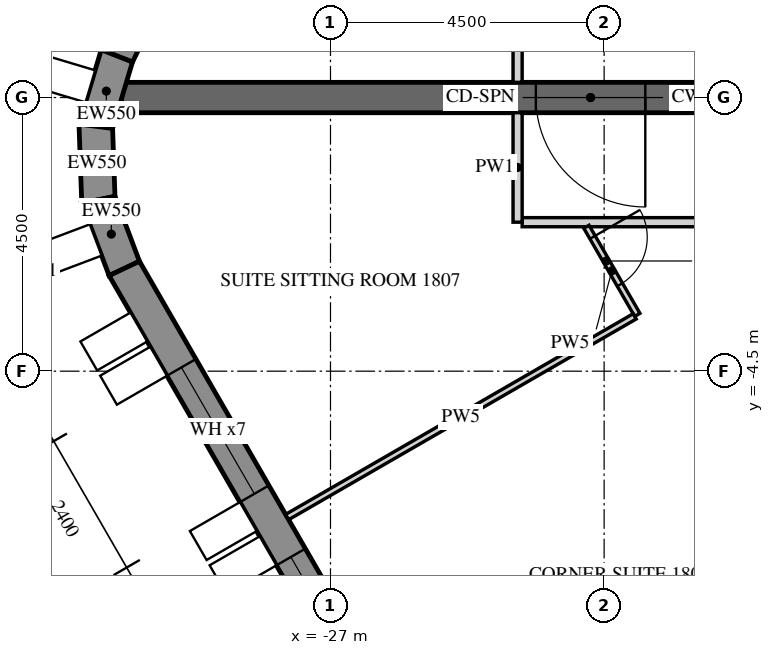
"""IFC4 building model, lengths in metres.
Left out: names, types, materials, properties, quantities, classifications, styles, units other than length and angle.
Written with IfcOpenShell. Run it as: python <this file> out.ifc"""

import sys

from ifc_helpers import new_model, si_unit, direction, frame, frame_2d, origin, place, context, subcontext, project, spatial, polyline, rectangle, outline, extrude, element, fill, save


model = new_model("IFC4")
c1 = context("Model", 3, precision=1e-05, world=origin(), true_north=direction((0.0, 1.0)))
c2 = subcontext(c1, "Body", "Model", "MODEL_VIEW")
j1 = project(units=[si_unit("LENGTHUNIT", "METRE"), si_unit("PLANEANGLEUNIT", "RADIAN")], contexts=[c1])
p1 = place(None, origin())
s1 = spatial("IfcSite", under=j1, at=p1, CompositionType="ELEMENT")
p2 = place(p1, origin())
s2 = spatial("IfcBuilding", under=s1, at=p2, CompositionType="ELEMENT")
p3 = place(p2, frame((0.0, 0.0, 226.8)))
s3 = spatial("IfcBuildingStorey", under=s2, at=p3, CompositionType="ELEMENT", Elevation=226.8)
p4 = place(p3, frame((-18.345, 25.633, -0.15), z_axis=(0.0, 0.0, 1.0), x_axis=(-0.43837181828, -0.898793718791, 0.0)))
e1 = element("IfcWall", 1, at=p4, inside=s3, PredefinedType="SOLIDWALL", context=c2, shape_type="SweptSolid", body=[
    extrude(outline(polyline([(-0.026, -0.275), (27.78, -0.275), (27.735, 0.275), (0.026, 0.275), (-0.026, -0.275)])), origin(), (0.0, 0.0, 1.0), 3.9),
])
p5 = place(p4, frame((1.879, 0.0, 1.05)))
e2 = element("IfcOpeningElement", 2, at=p5, cuts=e1, PredefinedType="OPENING", context=c2, shape_type="SweptSolid", body=[
    extrude(rectangle(XDim=2.4, YDim=2.4, at=frame_2d((1.2, 1.2))), frame((0.0, 0.285, 0.0), z_axis=(0.0, -1.0, 0.0), x_axis=(1.0, 0.0, 0.0)), (0.0, 0.0, 1.0), 0.57),
])
p6 = place(p4, frame((5.479, 0.0, 1.05)))
e3 = element("IfcOpeningElement", 3, at=p6, cuts=e1, PredefinedType="OPENING", context=c2, shape_type="SweptSolid", body=[
    extrude(rectangle(XDim=2.4, YDim=2.4, at=frame_2d((1.2, 1.2))), frame((0.0, 0.285, 0.0), z_axis=(0.0, -1.0, 0.0), x_axis=(1.0, 0.0, 0.0)), (0.0, 0.0, 1.0), 0.57),
])
p7 = place(p4, frame((9.079, 0.0, 1.05)))
e4 = element("IfcOpeningElement", 4, at=p7, cuts=e1, PredefinedType="OPENING", context=c2, shape_type="SweptSolid", body=[
    extrude(rectangle(XDim=2.4, YDim=2.4, at=frame_2d((1.2, 1.2))), frame((0.0, 0.285, 0.0), z_axis=(0.0, -1.0, 0.0), x_axis=(1.0, 0.0, 0.0)), (0.0, 0.0, 1.0), 0.57),
])
p8 = place(p4, frame((12.679, 0.0, 1.05)))
e5 = element("IfcOpeningElement", 5, at=p8, cuts=e1, PredefinedType="OPENING", context=c2, shape_type="SweptSolid", body=[
    extrude(rectangle(XDim=2.4, YDim=2.4, at=frame_2d((1.2, 1.2))), frame((0.0, 0.285, 0.0), z_axis=(0.0, -1.0, 0.0), x_axis=(1.0, 0.0, 0.0)), (0.0, 0.0, 1.0), 0.57),
])
p9 = place(p4, frame((16.279, 0.0, 1.05)))
e6 = element("IfcOpeningElement", 6, at=p9, cuts=e1, PredefinedType="OPENING", context=c2, shape_type="SweptSolid", body=[
    extrude(rectangle(XDim=2.4, YDim=2.4, at=frame_2d((1.2, 1.2))), frame((0.0, 0.285, 0.0), z_axis=(0.0, -1.0, 0.0), x_axis=(1.0, 0.0, 0.0)), (0.0, 0.0, 1.0), 0.57),
])
p10 = place(p4, frame((19.879, 0.0, 1.05)))
e7 = element("IfcOpeningElement", 7, at=p10, cuts=e1, PredefinedType="OPENING", context=c2, shape_type="SweptSolid", body=[
    extrude(rectangle(XDim=2.4, YDim=2.4, at=frame_2d((1.2, 1.2))), frame((0.0, 0.285, 0.0), z_axis=(0.0, -1.0, 0.0), x_axis=(1.0, 0.0, 0.0)), (0.0, 0.0, 1.0), 0.57),
])
p11 = place(p4, frame((23.479, 0.0, 1.05)))
e8 = element("IfcOpeningElement", 8, at=p11, cuts=e1, PredefinedType="OPENING", context=c2, shape_type="SweptSolid", body=[
    extrude(rectangle(XDim=2.4, YDim=2.4, at=frame_2d((1.2, 1.2))), frame((0.0, 0.285, 0.0), z_axis=(0.0, -1.0, 0.0), x_axis=(1.0, 0.0, 0.0)), (0.0, 0.0, 1.0), 0.57),
])
p12 = place(p3, frame((-30.513, 0.684, -0.15), z_axis=(0.0, 0.0, 1.0), x_axis=(-0.286736058109, -0.958009620505, 0.0)))
e9 = element("IfcWall", 9, at=p12, inside=s3, PredefinedType="SOLIDWALL", context=c2, shape_type="SweptSolid", body=[
    extrude(outline(polyline([(-0.022, -0.275), (1.253, -0.275), (1.163, 0.275), (0.022, 0.275), (-0.022, -0.275)])), origin(), (0.0, 0.0, 1.0), 3.9),
])
p13 = place(p3, frame((-30.86, -0.473, -0.15), z_axis=(0.0, 0.0, 1.0), x_axis=(0.03495638276, -0.999388838893, 0.0)))
e10 = element("IfcWall", 10, at=p13, inside=s3, PredefinedType="SOLIDWALL", context=c2, shape_type="SweptSolid", body=[
    extrude(outline(polyline([(-0.045, -0.275), (1.253, -0.275), (1.163, 0.275), (0.045, 0.275), (-0.045, -0.275)])), origin(), (0.0, 0.0, 1.0), 3.9),
])
p14 = place(p3, frame((-30.817, -1.681, -0.15), z_axis=(0.0, 0.0, 1.0), x_axis=(0.352850303963, -0.935679786569, 0.0)))
e11 = element("IfcWall", 11, at=p14, inside=s3, PredefinedType="SOLIDWALL", context=c2, shape_type="SweptSolid", body=[
    extrude(outline(polyline([(-0.045, -0.275), (1.23, -0.275), (1.186, 0.275), (0.045, 0.275), (-0.045, -0.275)])), origin(), (0.0, 0.0, 1.0), 3.9),
])
p15 = place(p3, frame((-30.391, -2.811, -0.15), z_axis=(0.0, 0.0, 1.0), x_axis=(0.499998569178, -0.866026229868, 0.0)))
e12 = element("IfcWall", 12, at=p15, inside=s3, PredefinedType="SOLIDWALL", context=c2, shape_type="SweptSolid", body=[
    extrude(outline(polyline([(-0.022, -0.275), (27.783, -0.275), (27.732, 0.275), (0.022, 0.275), (-0.022, -0.275)])), origin(), (0.0, 0.0, 1.0), 3.9),
])
p16 = place(p15, frame((1.879, 0.0, 1.05)))
e13 = element("IfcOpeningElement", 13, at=p16, cuts=e12, PredefinedType="OPENING", context=c2, shape_type="SweptSolid", body=[
    extrude(rectangle(XDim=2.4, YDim=2.4, at=frame_2d((1.2, 1.2))), frame((0.0, 0.285, 0.0), z_axis=(0.0, -1.0, 0.0), x_axis=(1.0, 0.0, 0.0)), (0.0, 0.0, 1.0), 0.57),
])
p17 = place(p15, frame((5.479, 0.0, 1.05)))
e14 = element("IfcOpeningElement", 14, at=p17, cuts=e12, PredefinedType="OPENING", context=c2, shape_type="SweptSolid", body=[
    extrude(rectangle(XDim=2.4, YDim=2.4, at=frame_2d((1.2, 1.2))), frame((0.0, 0.285, 0.0), z_axis=(0.0, -1.0, 0.0), x_axis=(1.0, 0.0, 0.0)), (0.0, 0.0, 1.0), 0.57),
])
p18 = place(p15, frame((9.079, 0.0, 1.05)))
e15 = element("IfcOpeningElement", 15, at=p18, cuts=e12, PredefinedType="OPENING", context=c2, shape_type="SweptSolid", body=[
    extrude(rectangle(XDim=2.4, YDim=2.4, at=frame_2d((1.2, 1.2))), frame((0.0, 0.285, 0.0), z_axis=(0.0, -1.0, 0.0), x_axis=(1.0, 0.0, 0.0)), (0.0, 0.0, 1.0), 0.57),
])
p19 = place(p15, frame((12.679, 0.0, 1.05)))
e16 = element("IfcOpeningElement", 16, at=p19, cuts=e12, PredefinedType="OPENING", context=c2, shape_type="SweptSolid", body=[
    extrude(rectangle(XDim=2.4, YDim=2.4, at=frame_2d((1.2, 1.2))), frame((0.0, 0.285, 0.0), z_axis=(0.0, -1.0, 0.0), x_axis=(1.0, 0.0, 0.0)), (0.0, 0.0, 1.0), 0.57),
])
p20 = place(p15, frame((16.279, 0.0, 1.05)))
e17 = element("IfcOpeningElement", 17, at=p20, cuts=e12, PredefinedType="OPENING", context=c2, shape_type="SweptSolid", body=[
    extrude(rectangle(XDim=2.4, YDim=2.4, at=frame_2d((1.2, 1.2))), frame((0.0, 0.285, 0.0), z_axis=(0.0, -1.0, 0.0), x_axis=(1.0, 0.0, 0.0)), (0.0, 0.0, 1.0), 0.57),
])
p21 = place(p15, frame((19.879, 0.0, 1.05)))
e18 = element("IfcOpeningElement", 18, at=p21, cuts=e12, PredefinedType="OPENING", context=c2, shape_type="SweptSolid", body=[
    extrude(rectangle(XDim=2.4, YDim=2.4, at=frame_2d((1.2, 1.2))), frame((0.0, 0.285, 0.0), z_axis=(0.0, -1.0, 0.0), x_axis=(1.0, 0.0, 0.0)), (0.0, 0.0, 1.0), 0.57),
])
p22 = place(p15, frame((23.479, 0.0, 1.05)))
e19 = element("IfcOpeningElement", 19, at=p22, cuts=e12, PredefinedType="OPENING", context=c2, shape_type="SweptSolid", body=[
    extrude(rectangle(XDim=2.4, YDim=2.4, at=frame_2d((1.2, 1.2))), frame((0.0, 0.285, 0.0), z_axis=(0.0, -1.0, 0.0), x_axis=(1.0, 0.0, 0.0)), (0.0, 0.0, 1.0), 0.57),
])
p23 = place(p3, frame((-15.011, 0.0, -0.15), z_axis=(0.0, 0.0, 1.0), x_axis=(-1.0, 0.0, 0.0)))
e20 = element("IfcWall", 20, at=p23, inside=s3, PredefinedType="SHEAR", context=c2, shape_type="SweptSolid", body=[
    extrude(rectangle(XDim=15.424, YDim=0.5, at=frame_2d((7.712, 0.0))), origin(), (0.0, 0.0, 1.0), 3.9),
])
p24 = place(p23, frame((6.812, 0.0, 0.15)))
e21 = element("IfcOpeningElement", 21, at=p24, cuts=e20, PredefinedType="OPENING", context=c2, shape_type="SweptSolid", body=[
    extrude(rectangle(XDim=1.8, YDim=2.4, at=frame_2d((0.9, 1.2))), frame((0.0, 0.26, 0.0), z_axis=(0.0, -1.0, 0.0), x_axis=(1.0, 0.0, 0.0)), (0.0, 0.0, 1.0), 0.52),
])
p25 = place(p3, frame((-23.923, 1.975, 0.0), z_axis=(0.0, 0.0, 1.0), x_axis=(0.0, -1.0, 0.0)))
e22 = element("IfcWall", 22, at=p25, inside=s3, PredefinedType="PARTITIONING", context=c2, shape_type="SweptSolid", body=[
    extrude(rectangle(XDim=1.725, YDim=0.15, at=frame_2d((0.863, 0.0))), origin(), (0.0, 0.0, 1.0), 2.988),
])
p26 = place(p3, frame((-23.848, -2.05, 0.0), z_axis=(0.0, 0.0, 1.0), x_axis=(1.0, 0.0, 0.0)))
e23 = element("IfcWall", 23, at=p26, inside=s3, PredefinedType="PARTITIONING", context=c2, shape_type="SweptSolid", body=[
    extrude(rectangle(XDim=7.942, YDim=0.15, at=frame_2d((3.971, 0.0))), origin(), (0.0, 0.0, 1.0), 2.988),
])
p27 = place(p3, frame((-23.923, -0.25, 0.0), z_axis=(0.0, 0.0, 1.0), x_axis=(0.0, -1.0, 0.0)))
e24 = element("IfcWall", 24, at=p27, inside=s3, PredefinedType="PARTITIONING", context=c2, shape_type="SweptSolid", body=[
    extrude(rectangle(XDim=1.8, YDim=0.15, at=frame_2d((0.9, 0.0))), origin(), (0.0, 0.0, 1.0), 2.988),
])
p28 = place(p3, frame((-22.791, -2.125, 0.0), z_axis=(0.0, 0.0, 1.0), x_axis=(0.500046635412, -0.865998477143, 0.0)))
e25 = element("IfcWall", 25, at=p28, inside=s3, PredefinedType="PARTITIONING", context=c2, shape_type="SweptSolid", body=[
    extrude(rectangle(XDim=1.673, YDim=0.1, at=frame_2d((0.836, 0.0))), origin(), (0.0, 0.0, 1.0), 2.988),
])
p29 = place(p28, frame((0.2, 0.0, 0.0)))
e26 = element("IfcOpeningElement", 26, at=p29, cuts=e25, PredefinedType="OPENING", context=c2, shape_type="SweptSolid", body=[
    extrude(rectangle(XDim=0.9, YDim=2.1, at=frame_2d((0.45, 1.05))), frame((0.0, 0.06, 0.0), z_axis=(0.0, -1.0, 0.0), x_axis=(1.0, 0.0, 0.0)), (0.0, 0.0, 1.0), 0.12),
])
p30 = place(p3, frame((-21.998, -3.599, 0.0), z_axis=(0.0, 0.0, 1.0), x_axis=(-0.866014946329, -0.500018112406, 0.0)))
e27 = element("IfcWall", 27, at=p30, inside=s3, PredefinedType="PARTITIONING", context=c2, shape_type="SweptSolid", body=[
    extrude(rectangle(XDim=6.6, YDim=0.1, at=frame_2d((3.3, 0.0))), origin(), (0.0, 0.0, 1.0), 2.988),
])
p31 = place(p3, frame((-24.114, -13.134, 0.0), z_axis=(0.0, 0.0, 1.0), x_axis=(0.866024255907, 0.500001988177, 0.0)))
e28 = element("IfcWall", 28, at=p31, inside=s3, PredefinedType="PARTITIONING", context=c2, shape_type="SweptSolid", body=[
    extrude(rectangle(XDim=12.575, YDim=0.18, at=frame_2d((6.288, 0.0))), origin(), (0.0, 0.0, 1.0), 2.988),
])
p32 = place(p16, frame((0.0, 0.205, 0.0)))
e29 = element("IfcWindow", 29, at=p32, inside=s3, PartitioningType="DOUBLE_PANEL_VERTICAL", PredefinedType="WINDOW", context=c2, shape_type="SweptSolid", body=[
    extrude(rectangle(XDim=2.4, YDim=2.4, at=frame_2d((1.2, 1.2))), frame((0.0, 0.03, 0.0), z_axis=(0.0, -1.0, 0.0), x_axis=(1.0, 0.0, 0.0)), (0.0, 0.0, 1.0), 0.06),
])
fill(e13, e29)
p33 = place(p17, frame((0.0, 0.205, 0.0)))
e30 = element("IfcWindow", 30, at=p33, inside=s3, PartitioningType="DOUBLE_PANEL_VERTICAL", PredefinedType="WINDOW", context=c2, shape_type="SweptSolid", body=[
    extrude(rectangle(XDim=2.4, YDim=2.4, at=frame_2d((1.2, 1.2))), frame((0.0, 0.03, 0.0), z_axis=(0.0, -1.0, 0.0), x_axis=(1.0, 0.0, 0.0)), (0.0, 0.0, 1.0), 0.06),
])
fill(e14, e30)
p34 = place(p24, origin())
e31 = element("IfcDoor", 31, at=p34, inside=s3, OperationType="DOUBLE_DOOR_SINGLE_SWING", PredefinedType="DOOR", context=c2, shape_type="SweptSolid", body=[
    extrude(rectangle(XDim=1.8, YDim=2.4, at=frame_2d((0.9, 1.2))), frame((0.0, 0.025, 0.0), z_axis=(0.0, -1.0, 0.0), x_axis=(1.0, 0.0, 0.0)), (0.0, 0.0, 1.0), 0.05),
])
fill(e21, e31)
p35 = place(p29, origin())
e32 = element("IfcDoor", 32, at=p35, inside=s3, OperationType="SINGLE_SWING_RIGHT", PredefinedType="DOOR", context=c2, shape_type="SweptSolid", body=[
    extrude(rectangle(XDim=0.9, YDim=2.1, at=frame_2d((0.45, 1.05))), frame((0.0, 0.025, 0.0), z_axis=(0.0, -1.0, 0.0), x_axis=(1.0, 0.0, 0.0)), (0.0, 0.0, 1.0), 0.05),
])
fill(e26, e32)
save(model, sys.argv[1])
